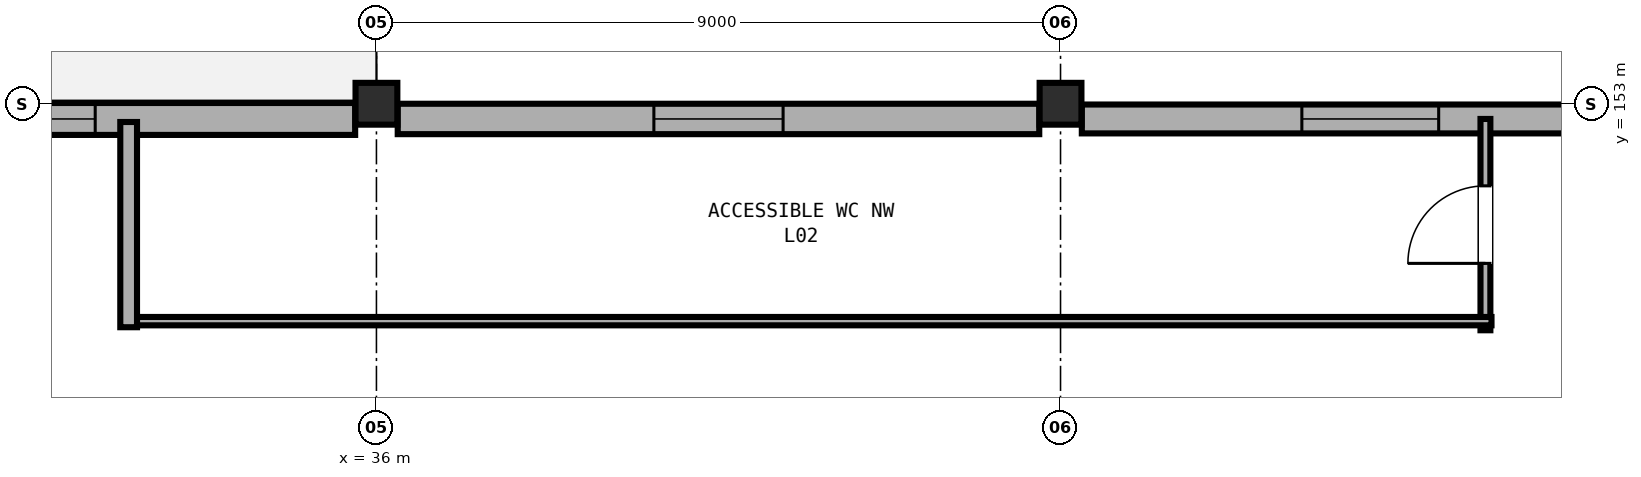
"""IFC4 building model, lengths in metres.
Left out: names, types, materials, properties, quantities, classifications, styles, units other than length and angle.
Written with IfcOpenShell. Run it as: python <this file> out.ifc"""

import sys

from ifc_helpers import new_model, si_unit, direction, frame, frame_2d, origin, origin_2d, place, context, subcontext, project, spatial, rectangle, extrude, element, fill, save


model = new_model("IFC4")
c1 = context("Model", 3, precision=1e-05, world=origin(), true_north=direction((0.0, 1.0)))
c2 = subcontext(c1, "Body", "Model", "MODEL_VIEW")
j1 = project(units=[si_unit("LENGTHUNIT", "METRE"), si_unit("PLANEANGLEUNIT", "RADIAN")], contexts=[c1])
p1 = place(None, origin())
s1 = spatial("IfcSite", under=j1, at=p1, CompositionType="ELEMENT")
p2 = place(p1, origin())
s2 = spatial("IfcBuilding", under=s1, at=p2, CompositionType="ELEMENT")
p3 = place(p2, frame((0.0, 0.0, 9.6)))
s3 = spatial("IfcBuildingStorey", under=s2, at=p3, CompositionType="ELEMENT", Elevation=9.6)
for number, where, z_axis, x_axis in (
    (1, (36.0, 153.0, 0.0), (0.0, 0.0, 1.0), (1.0, 0.0, 0.0)),
    (2, (45.0, 153.0, 0.0), (0.0, 0.0, 1.0), (1.0, 0.0, 0.0)),
):
    element("IfcColumn", number, at=place(p3, frame(where, z_axis=z_axis, x_axis=x_axis)), inside=s3, PredefinedType="COLUMN", context=c2, shape_type="SweptSolid", body=[
        extrude(rectangle(XDim=0.55, YDim=0.55, at=origin_2d()), origin(), (0.0, 0.0, 1.0), 4.8),
    ])
p4 = place(p3, frame((27.28, 152.8, 0.0), z_axis=(0.0, 0.0, 1.0), x_axis=(1.0, 0.0, 0.0)))
e3 = element("IfcWall", 3, at=p4, inside=s3, PredefinedType="SOLIDWALL", context=c2, shape_type="SweptSolid", body=[
    extrude(rectangle(XDim=8.44, YDim=0.42, at=frame_2d((4.22, 0.0))), origin(), (0.0, 0.0, 1.0), 3.58),
])
p5 = place(p4, frame((3.42, 0.0, 0.9)))
e4 = element("IfcOpeningElement", 4, at=p5, cuts=e3, PredefinedType="OPENING", context=c2, shape_type="SweptSolid", body=[
    extrude(rectangle(XDim=1.6, YDim=1.65, at=frame_2d((0.8, 0.825))), frame((0.0, 0.22, 0.0), z_axis=(0.0, -1.0, 0.0), x_axis=(1.0, 0.0, 0.0)), (0.0, 0.0, 1.0), 0.44),
])
p6 = place(p3, frame((36.28, 152.8, 0.0), z_axis=(0.0, 0.0, 1.0), x_axis=(1.0, 0.0, 0.0)))
e5 = element("IfcWall", 5, at=p6, inside=s3, PredefinedType="SOLIDWALL", context=c2, shape_type="SweptSolid", body=[
    extrude(rectangle(XDim=8.44, YDim=0.4, at=frame_2d((4.22, 0.0))), origin(), (0.0, 0.0, 1.0), 3.58),
])
p7 = place(p6, frame((3.37, 0.0, 0.9)))
e6 = element("IfcOpeningElement", 6, at=p7, cuts=e5, PredefinedType="OPENING", context=c2, shape_type="SweptSolid", body=[
    extrude(rectangle(XDim=1.7, YDim=1.7, at=frame_2d((0.85, 0.85))), frame((0.0, 0.21, 0.0), z_axis=(0.0, -1.0, 0.0), x_axis=(1.0, 0.0, 0.0)), (0.0, 0.0, 1.0), 0.42),
])
p8 = place(p3, frame((45.28, 152.8, 0.0), z_axis=(0.0, 0.0, 1.0), x_axis=(1.0, 0.0, 0.0)))
e7 = element("IfcWall", 7, at=p8, inside=s3, PredefinedType="SOLIDWALL", context=c2, shape_type="SweptSolid", body=[
    extrude(rectangle(XDim=7.59, YDim=0.38, at=frame_2d((3.795, 0.0))), origin(), (0.0, 0.0, 1.0), 3.58),
])
p9 = place(p8, frame((2.895, 0.0, 0.9)))
e8 = element("IfcOpeningElement", 8, at=p9, cuts=e7, PredefinedType="OPENING", context=c2, shape_type="SweptSolid", body=[
    extrude(rectangle(XDim=1.8, YDim=1.75, at=frame_2d((0.9, 0.875))), frame((0.0, 0.2, 0.0), z_axis=(0.0, -1.0, 0.0), x_axis=(1.0, 0.0, 0.0)), (0.0, 0.0, 1.0), 0.4),
])
p10 = place(p3, frame((50.59, 150.02, 0.0), z_axis=(0.0, 0.0, 1.0), x_axis=(0.0, 1.0, 0.0)))
e9 = element("IfcWall", 9, at=p10, inside=s3, PredefinedType="PARTITIONING", context=c2, shape_type="SweptSolid", body=[
    extrude(rectangle(XDim=2.78, YDim=0.13, at=frame_2d((1.39, 0.0))), origin(), (0.0, 0.0, 1.0), 3.56),
])
p11 = place(p10, frame((0.88, 0.0, 0.0)))
e10 = element("IfcOpeningElement", 10, at=p11, cuts=e9, PredefinedType="OPENING", context=c2, shape_type="SweptSolid", body=[
    extrude(rectangle(XDim=1.02, YDim=2.16, at=frame_2d((0.51, 1.08))), frame((0.0, 0.075, 0.0), z_axis=(0.0, -1.0, 0.0), x_axis=(1.0, 0.0, 0.0)), (0.0, 0.0, 1.0), 0.15),
])
p12 = place(p3, frame((50.67, 150.14, 0.0), z_axis=(0.0, 0.0, 1.0), x_axis=(-1.0, 0.0, 0.0)))
e11 = element("IfcWall", 11, at=p12, inside=s3, PredefinedType="PARTITIONING", context=c2, shape_type="SweptSolid", body=[
    extrude(rectangle(XDim=18.01, YDim=0.11, at=frame_2d((9.005, 0.0))), origin(), (0.0, 0.0, 1.0), 3.56),
])
p13 = place(p3, frame((32.74, 150.06, 0.0), z_axis=(0.0, 0.0, 1.0), x_axis=(0.0, 1.0, 0.0)))
e12 = element("IfcWall", 12, at=p13, inside=s3, PredefinedType="PARTITIONING", context=c2, shape_type="SweptSolid", body=[
    extrude(rectangle(XDim=2.7, YDim=0.22, at=frame_2d((1.35, 0.0))), origin(), (0.0, 0.0, 1.0), 3.56),
])
p14 = place(p5, origin())
e13 = element("IfcWindow", 13, at=p14, inside=s3, PartitioningType="SINGLE_PANEL", PredefinedType="WINDOW", context=c2, shape_type="SweptSolid", body=[
    extrude(rectangle(XDim=1.6, YDim=1.65, at=frame_2d((0.8, 0.825))), frame((0.0, 0.03, 0.0), z_axis=(0.0, -1.0, 0.0), x_axis=(1.0, 0.0, 0.0)), (0.0, 0.0, 1.0), 0.06),
])
fill(e4, e13)
p15 = place(p7, origin())
e14 = element("IfcWindow", 14, at=p15, inside=s3, PartitioningType="SINGLE_PANEL", PredefinedType="WINDOW", context=c2, shape_type="SweptSolid", body=[
    extrude(rectangle(XDim=1.7, YDim=1.7, at=frame_2d((0.85, 0.85))), frame((0.0, 0.03, 0.0), z_axis=(0.0, -1.0, 0.0), x_axis=(1.0, 0.0, 0.0)), (0.0, 0.0, 1.0), 0.06),
])
fill(e6, e14)
p16 = place(p9, origin())
e15 = element("IfcWindow", 15, at=p16, inside=s3, PartitioningType="DOUBLE_PANEL_VERTICAL", PredefinedType="WINDOW", context=c2, shape_type="SweptSolid", body=[
    extrude(rectangle(XDim=1.8, YDim=1.75, at=frame_2d((0.9, 0.875))), frame((0.0, 0.03, 0.0), z_axis=(0.0, -1.0, 0.0), x_axis=(1.0, 0.0, 0.0)), (0.0, 0.0, 1.0), 0.06),
])
fill(e8, e15)
p17 = place(p11, origin())
e16 = element("IfcDoor", 16, at=p17, inside=s3, OperationType="SINGLE_SWING_LEFT", PredefinedType="DOOR", context=c2, shape_type="SweptSolid", body=[
    extrude(rectangle(XDim=1.02, YDim=2.16, at=frame_2d((0.51, 1.08))), frame((0.0, 0.025, 0.0), z_axis=(0.0, -1.0, 0.0), x_axis=(1.0, 0.0, 0.0)), (0.0, 0.0, 1.0), 0.05),
])
fill(e10, e16)
save(model, sys.argv[1])
